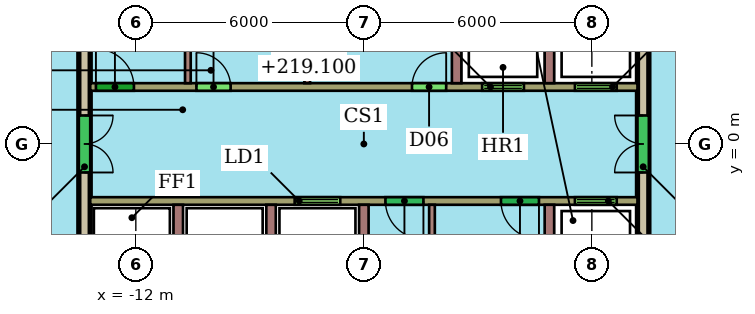
"""IFC4 building model, lengths in metres.
Left out: names, types, materials, properties, quantities, classifications, styles, units other than length and angle.
Written with IfcOpenShell. Run it as: python <this file> out.ifc"""

import sys

from ifc_helpers import new_model, si_unit, direction, frame, frame_2d, origin, place, context, subcontext, project, spatial, rectangle, extrude, element, fill, save


model = new_model("IFC4")
c1 = context("Model", 3, precision=1e-05, world=origin(), true_north=direction((0.0, 1.0)))
c2 = subcontext(c1, "Body", "Model", "MODEL_VIEW")
j1 = project(units=[si_unit("LENGTHUNIT", "METRE"), si_unit("PLANEANGLEUNIT", "RADIAN")], contexts=[c1])
p1 = place(None, origin())
s1 = spatial("IfcSite", under=j1, at=p1, CompositionType="ELEMENT")
p2 = place(p1, origin())
s2 = spatial("IfcBuilding", under=s1, at=p2, CompositionType="ELEMENT")
p3 = place(p2, frame((0.0, 0.0, 217.3)))
s3 = spatial("IfcBuildingStorey", under=s2, at=p3, CompositionType="ELEMENT", Elevation=217.3)
p4 = place(p3, frame((-13.35, 7.65, 0.0), z_axis=(0.0, 0.0, 1.0), x_axis=(0.0, -1.0, 0.0)))
e1 = element("IfcWall", 1, at=p4, inside=s3, PredefinedType="SHEAR", context=c2, shape_type="SweptSolid", body=[
    extrude(rectangle(XDim=15.3, YDim=0.3, at=frame_2d((7.65, 0.0))), origin(), (0.0, 0.0, 1.0), 3.3),
])
p5 = place(p4, frame((6.9, 0.0, 0.0)))
e2 = element("IfcOpeningElement", 2, at=p5, cuts=e1, PredefinedType="OPENING", context=c2, shape_type="SweptSolid", body=[
    extrude(rectangle(XDim=1.5, YDim=2.1, at=frame_2d((0.75, 1.05))), frame((0.0, 0.16, 0.0), z_axis=(0.0, -1.0, 0.0), x_axis=(1.0, 0.0, 0.0)), (0.0, 0.0, 1.0), 0.32),
])
p6 = place(p3, frame((1.35, -7.65, 0.0), z_axis=(0.0, 0.0, 1.0), x_axis=(0.0, 1.0, 0.0)))
e3 = element("IfcWall", 3, at=p6, inside=s3, PredefinedType="SHEAR", context=c2, shape_type="SweptSolid", body=[
    extrude(rectangle(XDim=15.3, YDim=0.3, at=frame_2d((7.65, 0.0))), origin(), (0.0, 0.0, 1.0), 3.3),
])
p7 = place(p6, frame((1.56, 0.0, 0.0)))
e4 = element("IfcOpeningElement", 4, at=p7, cuts=e3, PredefinedType="OPENING", context=c2, shape_type="SweptSolid", body=[
    extrude(rectangle(XDim=1.0, YDim=2.1, at=frame_2d((0.5, 1.05))), frame((0.0, 0.16, 0.0), z_axis=(0.0, -1.0, 0.0), x_axis=(1.0, 0.0, 0.0)), (0.0, 0.0, 1.0), 0.32),
])
p8 = place(p6, frame((6.9, 0.0, 0.0)))
e5 = element("IfcOpeningElement", 5, at=p8, cuts=e3, PredefinedType="OPENING", context=c2, shape_type="SweptSolid", body=[
    extrude(rectangle(XDim=1.5, YDim=2.1, at=frame_2d((0.75, 1.05))), frame((0.0, 0.16, 0.0), z_axis=(0.0, -1.0, 0.0), x_axis=(1.0, 0.0, 0.0)), (0.0, 0.0, 1.0), 0.32),
])
p9 = place(p3, frame((-13.2, 1.5, 0.0), z_axis=(0.0, 0.0, 1.0), x_axis=(1.0, 0.0, 0.0)))
e6 = element("IfcWall", 6, at=p9, inside=s3, PredefinedType="SHEAR", context=c2, shape_type="SweptSolid", body=[
    extrude(rectangle(XDim=14.4, YDim=0.2, at=frame_2d((7.2, 0.0))), origin(), (0.0, 0.0, 1.0), 3.3),
])
p10 = place(p9, frame((10.312, 0.0, 0.0)))
e7 = element("IfcOpeningElement", 7, at=p10, cuts=e6, PredefinedType="OPENING", context=c2, shape_type="SweptSolid", body=[
    extrude(rectangle(XDim=1.1, YDim=2.1, at=frame_2d((0.55, 1.05))), frame((0.0, 0.11, 0.0), z_axis=(0.0, -1.0, 0.0), x_axis=(1.0, 0.0, 0.0)), (0.0, 0.0, 1.0), 0.22),
])
p11 = place(p9, frame((12.754, 0.0, 0.0)))
e8 = element("IfcOpeningElement", 8, at=p11, cuts=e6, PredefinedType="OPENING", context=c2, shape_type="SweptSolid", body=[
    extrude(rectangle(XDim=1.1, YDim=2.1, at=frame_2d((0.55, 1.05))), frame((0.0, 0.11, 0.0), z_axis=(0.0, -1.0, 0.0), x_axis=(1.0, 0.0, 0.0)), (0.0, 0.0, 1.0), 0.22),
])
p12 = place(p9, frame((0.15, 0.0, 0.0)))
e9 = element("IfcOpeningElement", 9, at=p12, cuts=e6, PredefinedType="OPENING", context=c2, shape_type="SweptSolid", body=[
    extrude(rectangle(XDim=1.0, YDim=2.1, at=frame_2d((0.5, 1.05))), frame((0.0, 0.11, 0.0), z_axis=(0.0, -1.0, 0.0), x_axis=(1.0, 0.0, 0.0)), (0.0, 0.0, 1.0), 0.22),
])
p13 = place(p9, frame((2.794, 0.0, 0.0)))
e10 = element("IfcOpeningElement", 10, at=p13, cuts=e6, PredefinedType="OPENING", context=c2, shape_type="SweptSolid", body=[
    extrude(rectangle(XDim=0.9, YDim=2.1, at=frame_2d((0.45, 1.05))), frame((0.0, 0.11, 0.0), z_axis=(0.0, -1.0, 0.0), x_axis=(1.0, 0.0, 0.0)), (0.0, 0.0, 1.0), 0.22),
])
p14 = place(p9, frame((8.467, 0.0, 0.0)))
e11 = element("IfcOpeningElement", 11, at=p14, cuts=e6, PredefinedType="OPENING", context=c2, shape_type="SweptSolid", body=[
    extrude(rectangle(XDim=0.9, YDim=2.1, at=frame_2d((0.45, 1.05))), frame((0.0, 0.11, 0.0), z_axis=(0.0, -1.0, 0.0), x_axis=(1.0, 0.0, 0.0)), (0.0, 0.0, 1.0), 0.22),
])
p15 = place(p3, frame((1.2, -1.5, 0.0), z_axis=(0.0, 0.0, 1.0), x_axis=(-1.0, 0.0, 0.0)))
e12 = element("IfcWall", 12, at=p15, inside=s3, PredefinedType="SHEAR", context=c2, shape_type="SweptSolid", body=[
    extrude(rectangle(XDim=14.4, YDim=0.2, at=frame_2d((7.2, 0.0))), origin(), (0.0, 0.0, 1.0), 3.3),
])
p16 = place(p15, frame((7.821, 0.0, 0.0)))
e13 = element("IfcOpeningElement", 13, at=p16, cuts=e12, PredefinedType="OPENING", context=c2, shape_type="SweptSolid", body=[
    extrude(rectangle(XDim=1.2, YDim=2.1, at=frame_2d((0.6, 1.05))), frame((0.0, 0.11, 0.0), z_axis=(0.0, -1.0, 0.0), x_axis=(1.0, 0.0, 0.0)), (0.0, 0.0, 1.0), 0.22),
])
p17 = place(p15, frame((0.546, 0.0, 0.0)))
e14 = element("IfcOpeningElement", 14, at=p17, cuts=e12, PredefinedType="OPENING", context=c2, shape_type="SweptSolid", body=[
    extrude(rectangle(XDim=1.1, YDim=2.1, at=frame_2d((0.55, 1.05))), frame((0.0, 0.11, 0.0), z_axis=(0.0, -1.0, 0.0), x_axis=(1.0, 0.0, 0.0)), (0.0, 0.0, 1.0), 0.22),
])
p18 = place(p15, frame((5.632, 0.0, 0.0)))
e15 = element("IfcOpeningElement", 15, at=p18, cuts=e12, PredefinedType="OPENING", context=c2, shape_type="SweptSolid", body=[
    extrude(rectangle(XDim=1.0, YDim=2.1, at=frame_2d((0.5, 1.05))), frame((0.0, 0.11, 0.0), z_axis=(0.0, -1.0, 0.0), x_axis=(1.0, 0.0, 0.0)), (0.0, 0.0, 1.0), 0.22),
])
p19 = place(p15, frame((2.592, 0.0, 0.0)))
e16 = element("IfcOpeningElement", 16, at=p19, cuts=e12, PredefinedType="OPENING", context=c2, shape_type="SweptSolid", body=[
    extrude(rectangle(XDim=1.0, YDim=2.1, at=frame_2d((0.5, 1.05))), frame((0.0, 0.11, 0.0), z_axis=(0.0, -1.0, 0.0), x_axis=(1.0, 0.0, 0.0)), (0.0, 0.0, 1.0), 0.22),
])
for number, where, z_axis, x_axis in (
    (17, (-3.558, 1.6, 0.0), (0.0, 0.0, 1.0), (0.0, 1.0, 0.0)),
    (18, (-1.117, 1.6, 0.0), (0.0, 0.0, 1.0), (0.0, 1.0, 0.0)),
):
    element("IfcWall", number, at=place(p3, frame(where, z_axis=z_axis, x_axis=x_axis)), inside=s3, PredefinedType="SHEAR", context=c2, shape_type="SweptSolid", body=[
        extrude(rectangle(XDim=1.83, YDim=0.25, at=frame_2d((0.915, 0.0))), origin(), (0.0, 0.0, 1.0), 3.3),
    ])
for number, where, z_axis, x_axis in (
    (19, (-10.631, 1.6, 0.0), (0.0, 0.0, 1.0), (0.0, 1.0, 0.0)),
    (20, (-7.49, 1.6, 0.0), (0.0, 0.0, 1.0), (0.0, 1.0, 0.0)),
):
    element("IfcWall", number, at=place(p3, frame(where, z_axis=z_axis, x_axis=x_axis)), inside=s3, PredefinedType="PARTITIONING", context=c2, shape_type="SweptSolid", body=[
        extrude(rectangle(XDim=1.83, YDim=0.15, at=frame_2d((0.915, 0.0))), origin(), (0.0, 0.0, 1.0), 3.3),
    ])
for number, where, z_axis, x_axis in (
    (21, (-10.883, -1.6, 0.0), (0.0, 0.0, 1.0), (0.0, -1.0, 0.0)),
    (22, (-8.442, -1.6, 0.0), (0.0, 0.0, 1.0), (0.0, -1.0, 0.0)),
    (23, (-6.0, -1.6, 0.0), (0.0, 0.0, 1.0), (0.0, -1.0, 0.0)),
    (24, (-1.117, -1.6, 0.0), (0.0, 0.0, 1.0), (0.0, -1.0, 0.0)),
):
    element("IfcWall", number, at=place(p3, frame(where, z_axis=z_axis, x_axis=x_axis)), inside=s3, PredefinedType="SHEAR", context=c2, shape_type="SweptSolid", body=[
        extrude(rectangle(XDim=1.83, YDim=0.25, at=frame_2d((0.915, 0.0))), origin(), (0.0, 0.0, 1.0), 3.3),
    ])
p20 = place(p3, frame((-4.207, -1.6, 0.0), z_axis=(0.0, 0.0, 1.0), x_axis=(0.0, -1.0, 0.0)))
e25 = element("IfcWall", 25, at=p20, inside=s3, PredefinedType="PARTITIONING", context=c2, shape_type="SweptSolid", body=[
    extrude(rectangle(XDim=1.83, YDim=0.15, at=frame_2d((0.915, 0.0))), origin(), (0.0, 0.0, 1.0), 3.3),
])
p21 = place(p5, origin())
e26 = element("IfcDoor", 26, at=p21, inside=s3, OperationType="DOUBLE_DOOR_SINGLE_SWING", PredefinedType="NOTDEFINED", context=c2, shape_type="SweptSolid", body=[
    extrude(rectangle(XDim=1.5, YDim=2.1, at=frame_2d((0.75, 1.05))), frame((0.0, 0.025, 0.0), z_axis=(0.0, -1.0, 0.0), x_axis=(1.0, 0.0, 0.0)), (0.0, 0.0, 1.0), 0.05),
])
fill(e2, e26)
p22 = place(p8, origin())
e27 = element("IfcDoor", 27, at=p22, inside=s3, OperationType="DOUBLE_DOOR_SINGLE_SWING", PredefinedType="NOTDEFINED", context=c2, shape_type="SweptSolid", body=[
    extrude(rectangle(XDim=1.5, YDim=2.1, at=frame_2d((0.75, 1.05))), frame((0.0, 0.025, 0.0), z_axis=(0.0, -1.0, 0.0), x_axis=(1.0, 0.0, 0.0)), (0.0, 0.0, 1.0), 0.05),
])
fill(e5, e27)
p23 = place(p10, origin())
e28 = element("IfcDoor", 28, at=p23, inside=s3, OperationType="DOUBLE_DOOR_SLIDING", PredefinedType="NOTDEFINED", context=c2, shape_type="SweptSolid", body=[
    extrude(rectangle(XDim=1.1, YDim=2.1, at=frame_2d((0.55, 1.05))), frame((0.0, 0.025, 0.0), z_axis=(0.0, -1.0, 0.0), x_axis=(1.0, 0.0, 0.0)), (0.0, 0.0, 1.0), 0.05),
])
fill(e7, e28)
p24 = place(p11, origin())
e29 = element("IfcDoor", 29, at=p24, inside=s3, OperationType="DOUBLE_DOOR_SLIDING", PredefinedType="NOTDEFINED", context=c2, shape_type="SweptSolid", body=[
    extrude(rectangle(XDim=1.1, YDim=2.1, at=frame_2d((0.55, 1.05))), frame((0.0, 0.025, 0.0), z_axis=(0.0, -1.0, 0.0), x_axis=(1.0, 0.0, 0.0)), (0.0, 0.0, 1.0), 0.05),
])
fill(e8, e29)
p25 = place(p12, origin())
e30 = element("IfcDoor", 30, at=p25, inside=s3, OperationType="SINGLE_SWING_LEFT", PredefinedType="NOTDEFINED", context=c2, shape_type="SweptSolid", body=[
    extrude(rectangle(XDim=1.0, YDim=2.1, at=frame_2d((0.5, 1.05))), frame((0.0, 0.025, 0.0), z_axis=(0.0, -1.0, 0.0), x_axis=(1.0, 0.0, 0.0)), (0.0, 0.0, 1.0), 0.05),
])
fill(e9, e30)
p26 = place(p13, origin())
e31 = element("IfcDoor", 31, at=p26, inside=s3, OperationType="SINGLE_SWING_LEFT", PredefinedType="NOTDEFINED", context=c2, shape_type="SweptSolid", body=[
    extrude(rectangle(XDim=0.9, YDim=2.1, at=frame_2d((0.45, 1.05))), frame((0.0, 0.025, 0.0), z_axis=(0.0, -1.0, 0.0), x_axis=(1.0, 0.0, 0.0)), (0.0, 0.0, 1.0), 0.05),
])
fill(e10, e31)
p27 = place(p14, origin())
e32 = element("IfcDoor", 32, at=p27, inside=s3, OperationType="SINGLE_SWING_RIGHT", PredefinedType="NOTDEFINED", context=c2, shape_type="SweptSolid", body=[
    extrude(rectangle(XDim=0.9, YDim=2.1, at=frame_2d((0.45, 1.05))), frame((0.0, 0.025, 0.0), z_axis=(0.0, -1.0, 0.0), x_axis=(1.0, 0.0, 0.0)), (0.0, 0.0, 1.0), 0.05),
])
fill(e11, e32)
p28 = place(p16, origin())
e33 = element("IfcDoor", 33, at=p28, inside=s3, OperationType="DOUBLE_DOOR_SLIDING", PredefinedType="NOTDEFINED", context=c2, shape_type="SweptSolid", body=[
    extrude(rectangle(XDim=1.2, YDim=2.1, at=frame_2d((0.6, 1.05))), frame((0.0, 0.025, 0.0), z_axis=(0.0, -1.0, 0.0), x_axis=(1.0, 0.0, 0.0)), (0.0, 0.0, 1.0), 0.05),
])
fill(e13, e33)
p29 = place(p17, origin())
e34 = element("IfcDoor", 34, at=p29, inside=s3, OperationType="DOUBLE_DOOR_SLIDING", PredefinedType="NOTDEFINED", context=c2, shape_type="SweptSolid", body=[
    extrude(rectangle(XDim=1.1, YDim=2.1, at=frame_2d((0.55, 1.05))), frame((0.0, 0.025, 0.0), z_axis=(0.0, -1.0, 0.0), x_axis=(1.0, 0.0, 0.0)), (0.0, 0.0, 1.0), 0.05),
])
fill(e14, e34)
p30 = place(p18, origin())
e35 = element("IfcDoor", 35, at=p30, inside=s3, OperationType="SINGLE_SWING_LEFT", PredefinedType="NOTDEFINED", context=c2, shape_type="SweptSolid", body=[
    extrude(rectangle(XDim=1.0, YDim=2.1, at=frame_2d((0.5, 1.05))), frame((0.0, 0.025, 0.0), z_axis=(0.0, -1.0, 0.0), x_axis=(1.0, 0.0, 0.0)), (0.0, 0.0, 1.0), 0.05),
])
fill(e15, e35)
p31 = place(p19, origin())
e36 = element("IfcDoor", 36, at=p31, inside=s3, OperationType="SINGLE_SWING_LEFT", PredefinedType="NOTDEFINED", context=c2, shape_type="SweptSolid", body=[
    extrude(rectangle(XDim=1.0, YDim=2.1, at=frame_2d((0.5, 1.05))), frame((0.0, 0.025, 0.0), z_axis=(0.0, -1.0, 0.0), x_axis=(1.0, 0.0, 0.0)), (0.0, 0.0, 1.0), 0.05),
])
fill(e16, e36)
save(model, sys.argv[1])
